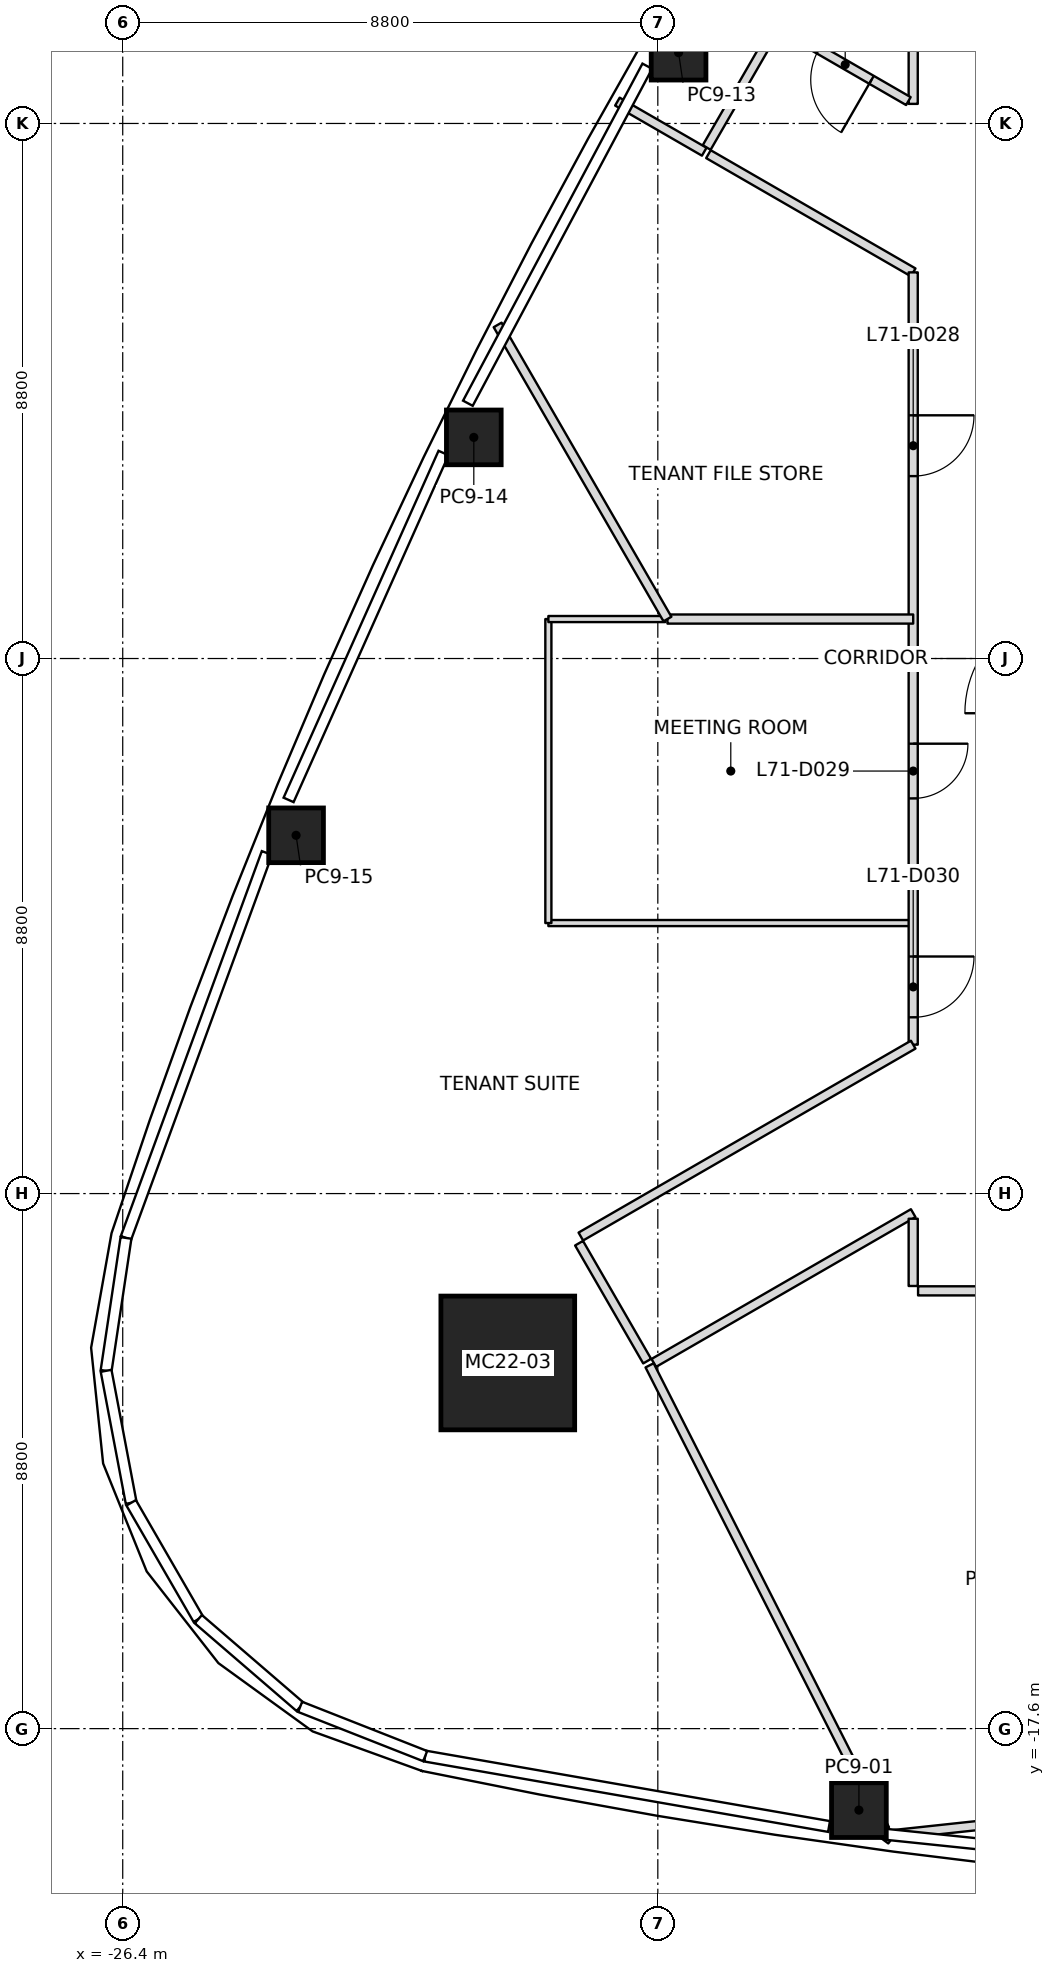
"""IFC4 building model, lengths in metres.
Left out: names, types, materials, properties, quantities, classifications, styles, units other than length and angle.
Written with IfcOpenShell. Run it as: python <this file> out.ifc"""

import sys

from ifc_helpers import new_model, si_unit, direction, frame, frame_2d, origin, origin_2d, place, context, subcontext, project, spatial, rectangle, extrude, element, fill, save


model = new_model("IFC4")
c1 = context("Model", 3, precision=1e-05, world=origin(), true_north=direction((0.0, 1.0)))
c2 = subcontext(c1, "Body", "Model", "MODEL_VIEW")
j1 = project(units=[si_unit("LENGTHUNIT", "METRE"), si_unit("PLANEANGLEUNIT", "RADIAN")], contexts=[c1])
p1 = place(None, origin())
s1 = spatial("IfcSite", under=j1, at=p1, CompositionType="ELEMENT")
p2 = place(p1, origin())
s2 = spatial("IfcBuilding", under=s1, at=p2, CompositionType="ELEMENT")
p3 = place(p2, frame((0.0, 0.0, 311.0)))
s3 = spatial("IfcBuildingStorey", under=s2, at=p3, CompositionType="ELEMENT", Elevation=311.0)
p4 = place(p3, frame((-20.067, -11.586, 0.0), z_axis=(0.027695790401, 0.015983033227, 0.999488612163), x_axis=(0.999616398022, -0.00044283261, -0.027692249912)))
e1 = element("IfcColumn", 1, at=p4, inside=s3, PredefinedType="COLUMN", context=c2, shape_type="SweptSolid", body=[
    extrude(rectangle(XDim=2.2, YDim=2.2, at=origin_2d()), origin(), (0.0, 0.0, 1.0), 4.002),
])
p5 = place(p3, frame((-14.293, -18.94, 0.0), z_axis=(0.017391452496, 0.010373848857, 0.999794939295), x_axis=(-0.990333494327, 0.137804297065, 0.01579701632)))
e2 = element("IfcColumn", 2, at=p5, inside=s3, PredefinedType="COLUMN", context=c2, shape_type="SweptSolid", body=[
    extrude(rectangle(XDim=0.9, YDim=0.9, at=origin_2d()), origin(), (0.0, 0.0, 1.0), 4.001),
])
p6 = place(p3, frame((-17.259, 9.964, 0.0), z_axis=(0.009887049298, -0.00573692984, 0.999934664812), x_axis=(0.499975560967, 0.866039512843, 2.5126546e-05)))
e3 = element("IfcColumn", 3, at=p6, inside=s3, PredefinedType="COLUMN", context=c2, shape_type="SweptSolid", body=[
    extrude(rectangle(XDim=0.9, YDim=0.9, at=origin_2d()), origin(), (0.0, 0.0, 1.0), 4.0),
])
p7 = place(p3, frame((-20.626, 3.637, 0.0), z_axis=(0.014036676147, 0.001952928855, 0.999899573853), x_axis=(0.439027393536, 0.898438787619, -0.007917867536)))
e4 = element("IfcColumn", 4, at=p7, inside=s3, PredefinedType="COLUMN", context=c2, shape_type="SweptSolid", body=[
    extrude(rectangle(XDim=0.9, YDim=0.9, at=origin_2d()), origin(), (0.0, 0.0, 1.0), 4.0),
])
p8 = place(p3, frame((-23.549, -2.908, 0.0), z_axis=(0.017696558482, 0.009885663704, 0.999794531627), x_axis=(0.375989104958, 0.926489098451, -0.015815922509)))
e5 = element("IfcColumn", 5, at=p8, inside=s3, PredefinedType="COLUMN", context=c2, shape_type="SweptSolid", body=[
    extrude(rectangle(XDim=0.9, YDim=0.9, at=origin_2d()), origin(), (0.0, 0.0, 1.0), 4.001),
])
p9 = place(p3, frame((-13.4, 0.649, 0.0), z_axis=(0.0, 0.0, 1.0), x_axis=(-1.0, 0.0, 0.0)))
e6 = element("IfcWall", 6, at=p9, inside=s3, PredefinedType="PARTITIONING", context=c2, shape_type="SweptSolid", body=[
    extrude(rectangle(XDim=4.042, YDim=0.15, at=frame_2d((2.021, 0.0))), origin(), (0.0, 0.0, 1.0), 3.45),
])
p10 = place(p3, frame((-17.441, 0.649, 0.0), z_axis=(0.0, 0.0, 1.0), x_axis=(-0.49999358888, 0.866029105215, 0.0)))
e7 = element("IfcWall", 7, at=p10, inside=s3, PredefinedType="PARTITIONING", context=c2, shape_type="SweptSolid", body=[
    extrude(rectangle(XDim=5.586, YDim=0.15, at=frame_2d((2.793, 0.0))), origin(), (0.0, 0.0, 1.0), 3.234),
])
p11 = place(p3, frame((-16.837, 8.335, 0.0), z_axis=(0.0, 0.0, 1.0), x_axis=(-0.866084496772, 0.499897633972, 0.0)))
e8 = element("IfcWall", 8, at=p11, inside=s3, PredefinedType="PARTITIONING", context=c2, shape_type="SweptSolid", body=[
    extrude(rectangle(XDim=1.649, YDim=0.15, at=frame_2d((0.824, 0.0))), origin(), (0.0, 0.0, 1.0), 3.234),
])
p12 = place(p3, frame((-17.735, -11.625, 0.0), z_axis=(0.0, 0.0, 1.0), x_axis=(0.452377124292, -0.891826741815, 0.0)))
e9 = element("IfcWall", 9, at=p12, inside=s3, PredefinedType="PARTITIONING", context=c2, shape_type="SweptSolid", body=[
    extrude(rectangle(XDim=8.555, YDim=0.15, at=frame_2d((4.278, 0.0))), origin(), (0.0, 0.0, 1.0), 3.45),
])
p13 = place(p3, frame((-8.2, -18.749, 0.0), z_axis=(0.0, 0.0, 1.0), x_axis=(-0.994268787809, -0.106909202549, 0.0)))
e10 = element("IfcWall", 10, at=p13, inside=s3, PredefinedType="PARTITIONING", context=c2, shape_type="SweptSolid", body=[
    extrude(rectangle(XDim=5.547, YDim=0.15, at=frame_2d((2.773, 0.0))), origin(), (0.0, 0.0, 1.0), 3.234),
])
p14 = place(p3, frame((-13.765, -19.428, 0.0), z_axis=(0.0, 0.0, 1.0), x_axis=(-0.803180127116, 0.595736253225, 0.0)))
e11 = element("IfcWall", 11, at=p14, inside=s3, PredefinedType="PARTITIONING", context=c2, shape_type="SweptSolid", body=[
    extrude(rectangle(XDim=0.184, YDim=0.15, at=frame_2d((0.092, 0.0))), origin(), (0.0, 0.0, 1.0), 3.45),
])
p15 = place(p3, frame((-18.896, -9.616, 0.0), z_axis=(0.0, 0.0, 1.0), x_axis=(0.500030632641, -0.866007717299, 0.0)))
e12 = element("IfcWall", 12, at=p15, inside=s3, PredefinedType="PARTITIONING", context=c2, shape_type="SweptSolid", body=[
    extrude(rectangle(XDim=2.24, YDim=0.15, at=frame_2d((1.12, 0.0))), origin(), (0.0, 0.0, 1.0), 3.233),
])
p16 = place(p3, frame((-16.768, 8.295, 0.0), z_axis=(0.0, 0.0, 1.0), x_axis=(0.866024577697, -0.500001430823, 0.0)))
e13 = element("IfcWall", 13, at=p16, inside=s3, PredefinedType="PARTITIONING", context=c2, shape_type="SweptSolid", body=[
    extrude(rectangle(XDim=3.889, YDim=0.15, at=frame_2d((1.944, 0.0))), origin(), (0.0, 0.0, 1.0), 3.45),
])
p17 = place(p3, frame((-13.4, 6.351, 0.0), z_axis=(0.0, 0.0, 1.0), x_axis=(0.0, -1.0, 0.0)))
e14 = element("IfcWall", 14, at=p17, inside=s3, PredefinedType="PARTITIONING", context=c2, shape_type="SweptSolid", body=[
    extrude(rectangle(XDim=12.702, YDim=0.15, at=frame_2d((6.351, 0.0))), origin(), (0.0, 0.0, 1.0), 3.393),
])
p18 = place(p17, frame((2.351, 0.0, 0.0)))
e15 = element("IfcOpeningElement", 15, at=p18, cuts=e14, PredefinedType="OPENING", context=c2, shape_type="SweptSolid", body=[
    extrude(rectangle(XDim=1.0, YDim=2.1, at=frame_2d((0.5, 1.05))), frame((0.0, 0.075, 0.0), z_axis=(0.0, -1.0, 0.0), x_axis=(1.0, 0.0, 0.0)), (0.0, 0.0, 1.0), 0.15),
])
p19 = place(p17, frame((7.752, 0.0, 0.0)))
e16 = element("IfcOpeningElement", 16, at=p19, cuts=e14, PredefinedType="OPENING", context=c2, shape_type="SweptSolid", body=[
    extrude(rectangle(XDim=0.9, YDim=2.1, at=frame_2d((0.45, 1.05))), frame((0.0, 0.075, 0.0), z_axis=(0.0, -1.0, 0.0), x_axis=(1.0, 0.0, 0.0)), (0.0, 0.0, 1.0), 0.15),
])
p20 = place(p17, frame((11.252, 0.0, 0.0)))
e17 = element("IfcOpeningElement", 17, at=p20, cuts=e14, PredefinedType="OPENING", context=c2, shape_type="SweptSolid", body=[
    extrude(rectangle(XDim=1.0, YDim=2.1, at=frame_2d((0.5, 1.05))), frame((0.0, 0.075, 0.0), z_axis=(0.0, -1.0, 0.0), x_axis=(1.0, 0.0, 0.0)), (0.0, 0.0, 1.0), 0.15),
])
p21 = place(p3, frame((-13.4, -6.351, 0.0), z_axis=(0.0, 0.0, 1.0), x_axis=(-0.866040017224, -0.499974687925, 0.0)))
e18 = element("IfcWall", 18, at=p21, inside=s3, PredefinedType="PARTITIONING", context=c2, shape_type="SweptSolid", body=[
    extrude(rectangle(XDim=6.312, YDim=0.15, at=frame_2d((3.156, 0.0))), origin(), (0.0, 0.0, 1.0), 3.317),
])
p22 = place(p3, frame((-17.666, -11.585, 0.0), z_axis=(0.0, 0.0, 1.0), x_axis=(0.86601721881, 0.500014176524, 0.0)))
e19 = element("IfcWall", 19, at=p22, inside=s3, PredefinedType="PARTITIONING", context=c2, shape_type="SweptSolid", body=[
    extrude(rectangle(XDim=4.926, YDim=0.15, at=frame_2d((2.463, 0.0))), origin(), (0.0, 0.0, 1.0), 3.233),
])
p23 = place(p3, frame((-13.4, -9.214, 0.0), z_axis=(0.0, 0.0, 1.0), x_axis=(0.0, -1.0, 0.0)))
e20 = element("IfcWall", 20, at=p23, inside=s3, PredefinedType="PARTITIONING", context=c2, shape_type="SweptSolid", body=[
    extrude(rectangle(XDim=1.106, YDim=0.15, at=frame_2d((0.553, 0.0))), origin(), (0.0, 0.0, 1.0), 3.233),
])
p24 = place(p3, frame((-15.677, 10.344, 0.0), z_axis=(0.0, 0.0, 1.0), x_axis=(-0.49994888933, -0.866054910533, 0.0)))
e21 = element("IfcWall", 21, at=p24, inside=s3, PredefinedType="PARTITIONING", context=c2, shape_type="SweptSolid", body=[
    extrude(rectangle(XDim=2.24, YDim=0.15, at=frame_2d((1.12, 0.0))), origin(), (0.0, 0.0, 1.0), 3.45),
])
p25 = place(p3, frame((-13.4, 10.32, 0.0), z_axis=(0.0, 0.0, 1.0), x_axis=(0.0, -1.0, 0.0)))
e22 = element("IfcWall", 22, at=p25, inside=s3, PredefinedType="PARTITIONING", context=c2, shape_type="SweptSolid", body=[
    extrude(rectangle(XDim=1.198, YDim=0.15, at=frame_2d((0.599, 0.0))), origin(), (0.0, 0.0, 1.0), 3.45),
])
p26 = place(p3, frame((-13.479, 9.168, 0.0), z_axis=(0.0, 0.0, 1.0), x_axis=(-0.866028773314, 0.499994163758, 0.0)))
e23 = element("IfcWall", 23, at=p26, inside=s3, PredefinedType="PARTITIONING", context=c2, shape_type="SweptSolid", body=[
    extrude(rectangle(XDim=2.411, YDim=0.15, at=frame_2d((1.206, 0.0))), origin(), (0.0, 0.0, 1.0), 3.45),
])
p27 = place(p26, frame((0.7, 0.0, 0.0)))
e24 = element("IfcOpeningElement", 24, at=p27, cuts=e23, PredefinedType="OPENING", context=c2, shape_type="SweptSolid", body=[
    extrude(rectangle(XDim=1.0, YDim=2.1, at=frame_2d((0.5, 1.05))), frame((0.0, 0.075, 0.0), z_axis=(0.0, -1.0, 0.0), x_axis=(1.0, 0.0, 0.0)), (0.0, 0.0, 1.0), 0.15),
])
p28 = place(p3, frame((-13.32, -10.4, 0.0), z_axis=(0.0, 0.0, 1.0), x_axis=(1.0, 0.0, 0.0)))
e25 = element("IfcWall", 25, at=p28, inside=s3, PredefinedType="PARTITIONING", context=c2, shape_type="SweptSolid", body=[
    extrude(rectangle(XDim=12.12, YDim=0.15, at=frame_2d((6.06, 0.0))), origin(), (0.0, 0.0, 1.0), 3.393),
])
p29 = place(p28, frame((2.02, 0.0, 0.0)))
e26 = element("IfcOpeningElement", 26, at=p29, cuts=e25, PredefinedType="OPENING", context=c2, shape_type="SweptSolid", body=[
    extrude(rectangle(XDim=1.0, YDim=2.1, at=frame_2d((0.5, 1.05))), frame((0.0, 0.075, 0.0), z_axis=(0.0, -1.0, 0.0), x_axis=(1.0, 0.0, 0.0)), (0.0, 0.0, 1.0), 0.15),
])
p30 = place(p3, frame((-13.43, -4.351, 0.0), z_axis=(0.0, 0.0, 1.0), x_axis=(-1.0, 0.0, 0.0)))
e27 = element("IfcWall", 27, at=p30, inside=s3, PredefinedType="PARTITIONING", context=c2, shape_type="SweptSolid", body=[
    extrude(rectangle(XDim=5.97, YDim=0.1, at=frame_2d((2.985, 0.0))), origin(), (0.0, 0.0, 1.0), 3.317),
])
p31 = place(p3, frame((-19.4, -4.351, 0.0), z_axis=(0.0, 0.0, 1.0), x_axis=(0.0, 1.0, 0.0)))
e28 = element("IfcWall", 28, at=p31, inside=s3, PredefinedType="PARTITIONING", context=c2, shape_type="SweptSolid", body=[
    extrude(rectangle(XDim=5.0, YDim=0.1, at=frame_2d((2.5, 0.0))), origin(), (0.0, 0.0, 1.0), 3.317),
])
p32 = place(p3, frame((-19.4, 0.649, 0.0), z_axis=(0.0, 0.0, 1.0), x_axis=(1.0, 0.0, 0.0)))
e29 = element("IfcWall", 29, at=p32, inside=s3, PredefinedType="PARTITIONING", context=c2, shape_type="SweptSolid", body=[
    extrude(rectangle(XDim=1.924, YDim=0.1, at=frame_2d((0.962, 0.0))), origin(), (0.0, 0.0, 1.0), 3.393),
])
p33 = place(p27, origin())
e30 = element("IfcDoor", 30, at=p33, inside=s3, OperationType="SINGLE_SWING_RIGHT", PredefinedType="DOOR", context=c2, shape_type="SweptSolid", body=[
    extrude(rectangle(XDim=1.0, YDim=2.1, at=frame_2d((0.5, 1.05))), frame((0.0, 0.025, 0.0), z_axis=(0.0, -1.0, 0.0), x_axis=(1.0, 0.0, 0.0)), (0.0, 0.0, 1.0), 0.05),
])
fill(e24, e30)
p34 = place(p18, origin())
e31 = element("IfcDoor", 31, at=p34, inside=s3, OperationType="SINGLE_SWING_RIGHT", PredefinedType="DOOR", context=c2, shape_type="SweptSolid", body=[
    extrude(rectangle(XDim=1.0, YDim=2.1, at=frame_2d((0.5, 1.05))), frame((0.0, 0.025, 0.0), z_axis=(0.0, -1.0, 0.0), x_axis=(1.0, 0.0, 0.0)), (0.0, 0.0, 1.0), 0.05),
])
fill(e15, e31)
p35 = place(p19, origin())
e32 = element("IfcDoor", 32, at=p35, inside=s3, OperationType="SINGLE_SWING_LEFT", PredefinedType="DOOR", context=c2, shape_type="SweptSolid", body=[
    extrude(rectangle(XDim=0.9, YDim=2.1, at=frame_2d((0.45, 1.05))), frame((0.0, 0.025, 0.0), z_axis=(0.0, -1.0, 0.0), x_axis=(1.0, 0.0, 0.0)), (0.0, 0.0, 1.0), 0.05),
])
fill(e16, e32)
p36 = place(p20, origin())
e33 = element("IfcDoor", 33, at=p36, inside=s3, OperationType="SINGLE_SWING_RIGHT", PredefinedType="DOOR", context=c2, shape_type="SweptSolid", body=[
    extrude(rectangle(XDim=1.0, YDim=2.1, at=frame_2d((0.5, 1.05))), frame((0.0, 0.025, 0.0), z_axis=(0.0, -1.0, 0.0), x_axis=(1.0, 0.0, 0.0)), (0.0, 0.0, 1.0), 0.05),
])
fill(e17, e33)
save(model, sys.argv[1])
